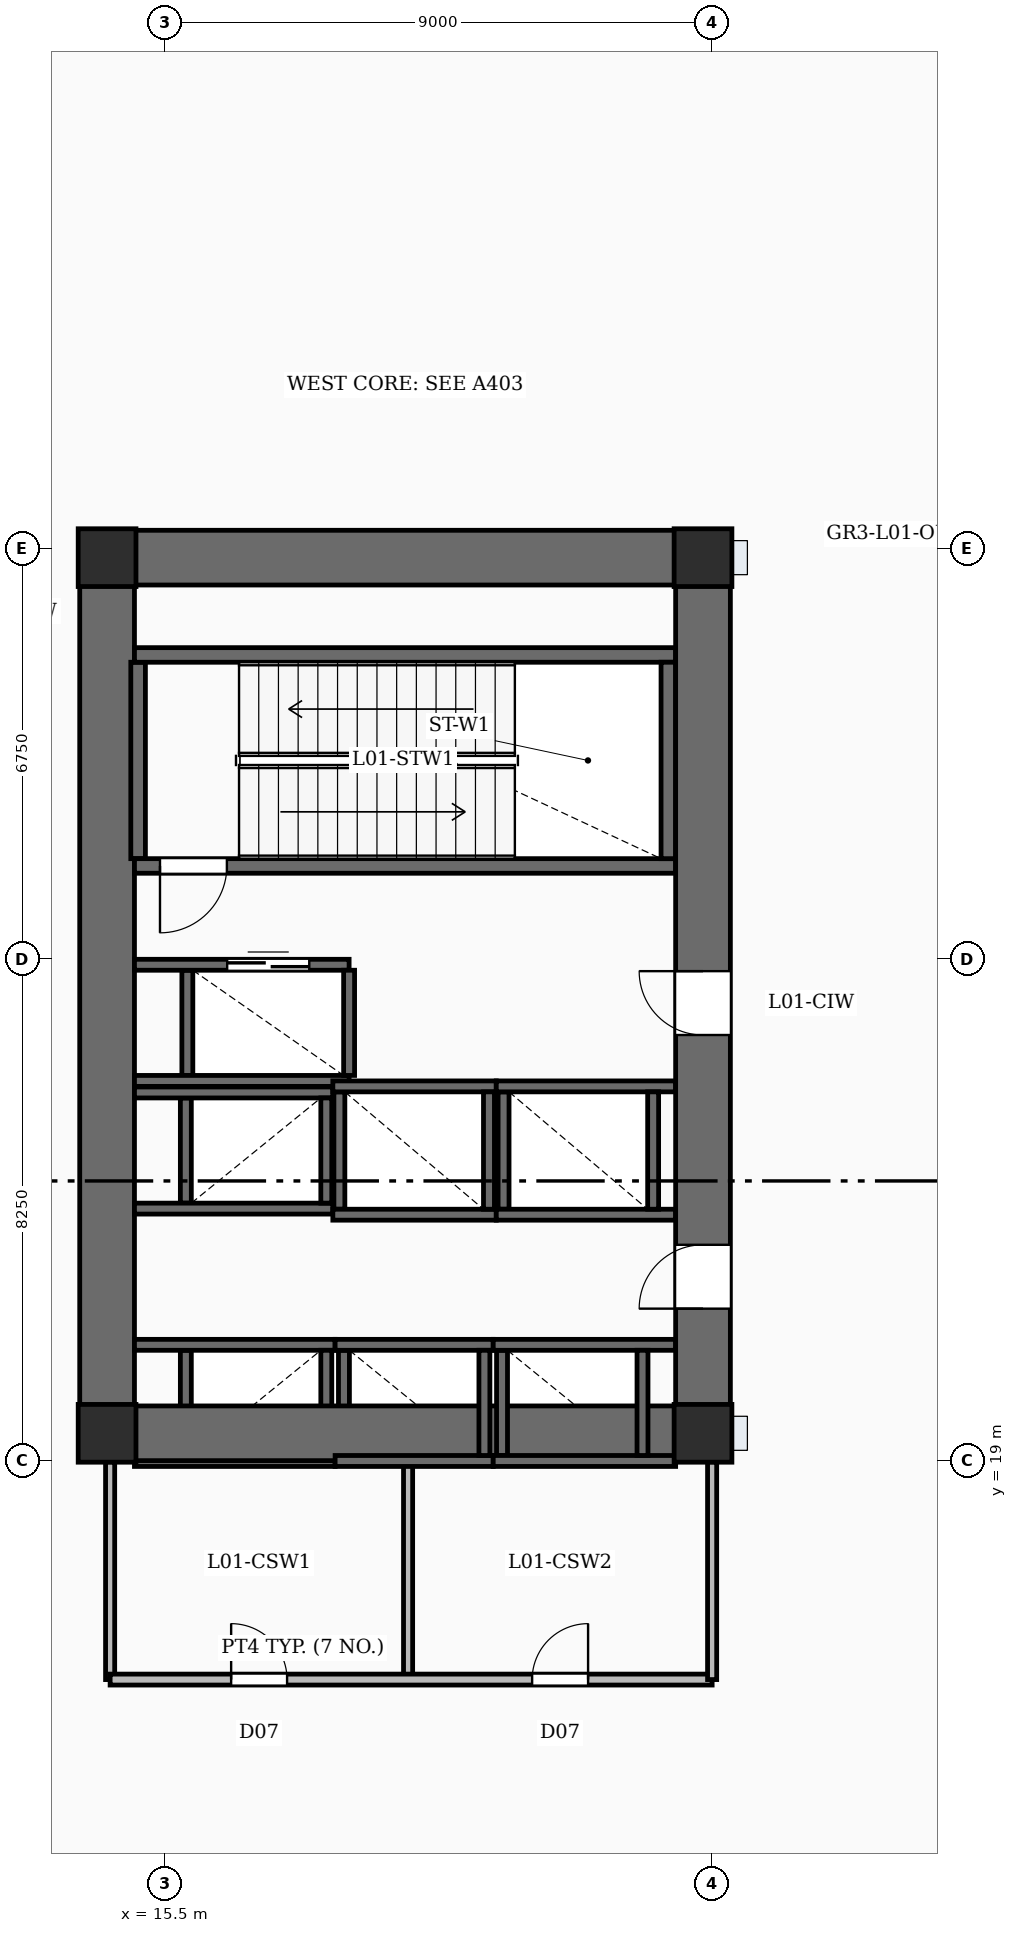
"""IFC4 building model, lengths in metres.
Left out: names, types, materials, properties, quantities, classifications, styles, units other than length and angle.
Written with IfcOpenShell. Run it as: python <this file> out.ifc"""

import sys

from ifc_helpers import new_model, si_unit, direction, frame, frame_2d, origin, origin_2d, place, context, subcontext, project, spatial, rectangle, extrude, element, fill, save


model = new_model("IFC4")
c1 = context("Model", 3, precision=1e-05, world=origin(), true_north=direction((0.0, 1.0)))
c2 = subcontext(c1, "Body", "Model", "MODEL_VIEW")
j1 = project(units=[si_unit("LENGTHUNIT", "METRE"), si_unit("PLANEANGLEUNIT", "RADIAN")], contexts=[c1])
p1 = place(None, origin())
s1 = spatial("IfcSite", under=j1, at=p1, CompositionType="ELEMENT")
p2 = place(p1, origin())
s2 = spatial("IfcBuilding", under=s1, at=p2, CompositionType="ELEMENT")
p3 = place(p2, frame((0.0, 0.0, 8.0)))
s3 = spatial("IfcBuildingStorey", under=s2, at=p3, CompositionType="ELEMENT", Elevation=8.0)
p4 = place(p3, frame((14.55, 19.0, -0.35), z_axis=(0.0, 0.0, 1.0), x_axis=(0.0, 1.0, 0.0)))
e1 = element("IfcWall", 1, at=p4, inside=s3, PredefinedType="SHEAR", context=c2, shape_type="SweptSolid", body=[
    extrude(rectangle(XDim=15.3, YDim=0.9, at=frame_2d((7.65, 0.0))), origin(), (0.0, 0.0, 1.0), 5.0),
])
p5 = place(p3, frame((24.35, 19.0, -0.35), z_axis=(0.0, 0.0, 1.0), x_axis=(0.0, 1.0, 0.0)))
e2 = element("IfcWall", 2, at=p5, inside=s3, PredefinedType="SHEAR", context=c2, shape_type="SweptSolid", body=[
    extrude(rectangle(XDim=15.3, YDim=0.9, at=frame_2d((7.65, 0.0))), origin(), (0.0, 0.0, 1.0), 5.0),
])
p6 = place(p5, frame((2.5, 0.0, 0.35)))
e3 = element("IfcOpeningElement", 3, at=p6, cuts=e2, PredefinedType="OPENING", context=c2, shape_type="SweptSolid", body=[
    extrude(rectangle(XDim=1.05, YDim=2.15, at=frame_2d((0.525, 1.075))), frame((0.0, 0.46, 0.0), z_axis=(0.0, -1.0, 0.0), x_axis=(1.0, 0.0, 0.0)), (0.0, 0.0, 1.0), 0.92),
])
p7 = place(p5, frame((7.0, 0.0, 0.35)))
e4 = element("IfcOpeningElement", 4, at=p7, cuts=e2, PredefinedType="OPENING", context=c2, shape_type="SweptSolid", body=[
    extrude(rectangle(XDim=1.05, YDim=2.15, at=frame_2d((0.525, 1.075))), frame((0.0, 0.46, 0.0), z_axis=(0.0, -1.0, 0.0), x_axis=(1.0, 0.0, 0.0)), (0.0, 0.0, 1.0), 0.92),
])
for number, where, z_axis, x_axis in (
    (5, (15.0, 19.45, -0.35), (0.0, 0.0, 1.0), (1.0, 0.0, 0.0)),
    (6, (15.0, 33.85, -0.35), (0.0, 0.0, 1.0), (1.0, 0.0, 0.0)),
):
    element("IfcWall", number, at=place(p3, frame(where, z_axis=z_axis, x_axis=x_axis)), inside=s3, PredefinedType="SHEAR", context=c2, shape_type="SweptSolid", body=[
        extrude(rectangle(XDim=8.9, YDim=0.9, at=frame_2d((4.45, 0.0))), origin(), (0.0, 0.0, 1.0), 5.0),
    ])
for number, where, z_axis, x_axis in (
    (7, (14.55, 19.45, -0.35), (0.0, 0.0, 1.0), (1.0, 0.0, 0.0)),
    (8, (24.35, 19.45, -0.35), (0.0, 0.0, 1.0), (1.0, 0.0, 0.0)),
    (9, (14.55, 33.85, -0.35), (0.0, 0.0, 1.0), (1.0, 0.0, 0.0)),
    (10, (24.35, 33.85, -0.35), (0.0, 0.0, 1.0), (1.0, 0.0, 0.0)),
):
    element("IfcColumn", number, at=place(p3, frame(where, z_axis=z_axis, x_axis=x_axis)), inside=s3, PredefinedType="COLUMN", context=c2, shape_type="SweptSolid", body=[
        extrude(rectangle(XDim=0.95, YDim=0.95, at=origin_2d()), origin(), (0.0, 0.0, 1.0), 5.0),
    ])
p8 = place(p3, frame((23.9, 28.78, 0.0), z_axis=(0.0, 0.0, 1.0), x_axis=(-1.0, 0.0, 0.0)))
e11 = element("IfcWall", 11, at=p8, inside=s3, PredefinedType="SOLIDWALL", context=c2, shape_type="SweptSolid", body=[
    extrude(rectangle(XDim=8.9, YDim=0.24, at=frame_2d((4.45, 0.0))), origin(), (0.0, 0.0, 1.0), 4.65),
])
p9 = place(p8, frame((7.38, 0.0, 0.0)))
e12 = element("IfcOpeningElement", 12, at=p9, cuts=e11, PredefinedType="OPENING", context=c2, shape_type="SweptSolid", body=[
    extrude(rectangle(XDim=1.1, YDim=2.15, at=frame_2d((0.55, 1.075))), frame((0.0, 0.13, 0.0), z_axis=(0.0, -1.0, 0.0), x_axis=(1.0, 0.0, 0.0)), (0.0, 0.0, 1.0), 0.26),
])
p10 = place(p3, frame((15.0, 32.25, 0.0), z_axis=(0.0, 0.0, 1.0), x_axis=(1.0, 0.0, 0.0)))
e13 = element("IfcWall", 13, at=p10, inside=s3, PredefinedType="SOLIDWALL", context=c2, shape_type="SweptSolid", body=[
    extrude(rectangle(XDim=8.9, YDim=0.24, at=frame_2d((4.45, 0.0))), origin(), (0.0, 0.0, 1.0), 4.65),
])
for number, where, z_axis, x_axis in (
    (14, (15.06, 28.9, 0.0), (0.0, 0.0, 1.0), (0.0, 1.0, 0.0)),
    (15, (23.78, 28.9, 0.0), (0.0, 0.0, 1.0), (0.0, 1.0, 0.0)),
):
    element("IfcWall", number, at=place(p3, frame(where, z_axis=z_axis, x_axis=x_axis)), inside=s3, PredefinedType="SOLIDWALL", context=c2, shape_type="SweptSolid", body=[
        extrude(rectangle(XDim=3.23, YDim=0.24, at=frame_2d((1.615, 0.0))), origin(), (0.0, 0.0, 1.0), 4.65),
    ])
for number, where, z_axis, x_axis in (
    (16, (15.0, 20.905, 0.0), (0.0, 0.0, 1.0), (1.0, 0.0, 0.0)),
    (17, (15.0, 18.995, 0.0), (0.0, 0.0, 1.0), (1.0, 0.0, 0.0)),
):
    element("IfcWall", number, at=place(p3, frame(where, z_axis=z_axis, x_axis=x_axis)), inside=s3, PredefinedType="SOLIDWALL", context=c2, shape_type="SweptSolid", body=[
        extrude(rectangle(XDim=3.3, YDim=0.18, at=frame_2d((1.65, 0.0))), origin(), (0.0, 0.0, 1.0), 4.65),
    ])
for number, where, z_axis, x_axis in (
    (18, (15.845, 19.085, 0.0), (0.0, 0.0, 1.0), (0.0, 1.0, 0.0)),
    (19, (18.155, 19.085, 0.0), (0.0, 0.0, 1.0), (0.0, 1.0, 0.0)),
):
    element("IfcWall", number, at=place(p3, frame(where, z_axis=z_axis, x_axis=x_axis)), inside=s3, PredefinedType="SOLIDWALL", context=c2, shape_type="SweptSolid", body=[
        extrude(rectangle(XDim=1.73, YDim=0.18, at=frame_2d((0.865, 0.0))), origin(), (0.0, 0.0, 1.0), 4.65),
    ])
for number, where, z_axis, x_axis in (
    (20, (18.3, 20.905, 0.0), (0.0, 0.0, 1.0), (1.0, 0.0, 0.0)),
    (21, (18.3, 18.995, 0.0), (0.0, 0.0, 1.0), (1.0, 0.0, 0.0)),
):
    element("IfcWall", number, at=place(p3, frame(where, z_axis=z_axis, x_axis=x_axis)), inside=s3, PredefinedType="SOLIDWALL", context=c2, shape_type="SweptSolid", body=[
        extrude(rectangle(XDim=2.6, YDim=0.18, at=frame_2d((1.3, 0.0))), origin(), (0.0, 0.0, 1.0), 4.65),
    ])
for number, where, z_axis, x_axis in (
    (22, (18.445, 19.085, 0.0), (0.0, 0.0, 1.0), (0.0, 1.0, 0.0)),
    (23, (20.755, 19.085, 0.0), (0.0, 0.0, 1.0), (0.0, 1.0, 0.0)),
):
    element("IfcWall", number, at=place(p3, frame(where, z_axis=z_axis, x_axis=x_axis)), inside=s3, PredefinedType="SOLIDWALL", context=c2, shape_type="SweptSolid", body=[
        extrude(rectangle(XDim=1.73, YDim=0.18, at=frame_2d((0.865, 0.0))), origin(), (0.0, 0.0, 1.0), 4.65),
    ])
for number, where, z_axis, x_axis in (
    (24, (20.9, 20.905, 0.0), (0.0, 0.0, 1.0), (1.0, 0.0, 0.0)),
    (25, (20.9, 18.995, 0.0), (0.0, 0.0, 1.0), (1.0, 0.0, 0.0)),
):
    element("IfcWall", number, at=place(p3, frame(where, z_axis=z_axis, x_axis=x_axis)), inside=s3, PredefinedType="SOLIDWALL", context=c2, shape_type="SweptSolid", body=[
        extrude(rectangle(XDim=3.0, YDim=0.18, at=frame_2d((1.5, 0.0))), origin(), (0.0, 0.0, 1.0), 4.65),
    ])
for number, where, z_axis, x_axis in (
    (26, (21.045, 19.085, 0.0), (0.0, 0.0, 1.0), (0.0, 1.0, 0.0)),
    (27, (23.355, 19.085, 0.0), (0.0, 0.0, 1.0), (0.0, 1.0, 0.0)),
):
    element("IfcWall", number, at=place(p3, frame(where, z_axis=z_axis, x_axis=x_axis)), inside=s3, PredefinedType="SOLIDWALL", context=c2, shape_type="SweptSolid", body=[
        extrude(rectangle(XDim=1.73, YDim=0.18, at=frame_2d((0.865, 0.0))), origin(), (0.0, 0.0, 1.0), 4.65),
    ])
for number, where, z_axis, x_axis in (
    (28, (15.0, 25.055, 0.0), (0.0, 0.0, 1.0), (1.0, 0.0, 0.0)),
    (29, (15.0, 23.145, 0.0), (0.0, 0.0, 1.0), (1.0, 0.0, 0.0)),
):
    element("IfcWall", number, at=place(p3, frame(where, z_axis=z_axis, x_axis=x_axis)), inside=s3, PredefinedType="SOLIDWALL", context=c2, shape_type="SweptSolid", body=[
        extrude(rectangle(XDim=3.262, YDim=0.18, at=frame_2d((1.631, 0.0))), origin(), (0.0, 0.0, 1.0), 4.65),
    ])
for number, where, z_axis, x_axis in (
    (30, (15.845, 23.235, 0.0), (0.0, 0.0, 1.0), (0.0, 1.0, 0.0)),
    (31, (18.155, 23.235, 0.0), (0.0, 0.0, 1.0), (0.0, 1.0, 0.0)),
):
    element("IfcWall", number, at=place(p3, frame(where, z_axis=z_axis, x_axis=x_axis)), inside=s3, PredefinedType="SOLIDWALL", context=c2, shape_type="SweptSolid", body=[
        extrude(rectangle(XDim=1.73, YDim=0.18, at=frame_2d((0.865, 0.0))), origin(), (0.0, 0.0, 1.0), 4.65),
    ])
for number, where, z_axis, x_axis in (
    (32, (18.262, 25.155, 0.0), (0.0, 0.0, 1.0), (1.0, 0.0, 0.0)),
    (33, (18.262, 23.045, 0.0), (0.0, 0.0, 1.0), (1.0, 0.0, 0.0)),
):
    element("IfcWall", number, at=place(p3, frame(where, z_axis=z_axis, x_axis=x_axis)), inside=s3, PredefinedType="SOLIDWALL", context=c2, shape_type="SweptSolid", body=[
        extrude(rectangle(XDim=2.688, YDim=0.18, at=frame_2d((1.344, 0.0))), origin(), (0.0, 0.0, 1.0), 4.65),
    ])
for number, where, z_axis, x_axis in (
    (34, (18.37, 23.135, 0.0), (0.0, 0.0, 1.0), (0.0, 1.0, 0.0)),
    (35, (20.83, 23.135, 0.0), (0.0, 0.0, 1.0), (0.0, 1.0, 0.0)),
):
    element("IfcWall", number, at=place(p3, frame(where, z_axis=z_axis, x_axis=x_axis)), inside=s3, PredefinedType="SOLIDWALL", context=c2, shape_type="SweptSolid", body=[
        extrude(rectangle(XDim=1.93, YDim=0.18, at=frame_2d((0.965, 0.0))), origin(), (0.0, 0.0, 1.0), 4.65),
    ])
for number, where, z_axis, x_axis in (
    (36, (20.95, 25.155, 0.0), (0.0, 0.0, 1.0), (1.0, 0.0, 0.0)),
    (37, (20.95, 23.045, 0.0), (0.0, 0.0, 1.0), (1.0, 0.0, 0.0)),
):
    element("IfcWall", number, at=place(p3, frame(where, z_axis=z_axis, x_axis=x_axis)), inside=s3, PredefinedType="SOLIDWALL", context=c2, shape_type="SweptSolid", body=[
        extrude(rectangle(XDim=2.95, YDim=0.18, at=frame_2d((1.475, 0.0))), origin(), (0.0, 0.0, 1.0), 4.65),
    ])
for number, where, z_axis, x_axis in (
    (38, (21.07, 23.135, 0.0), (0.0, 0.0, 1.0), (0.0, 1.0, 0.0)),
    (39, (23.53, 23.135, 0.0), (0.0, 0.0, 1.0), (0.0, 1.0, 0.0)),
):
    element("IfcWall", number, at=place(p3, frame(where, z_axis=z_axis, x_axis=x_axis)), inside=s3, PredefinedType="SOLIDWALL", context=c2, shape_type="SweptSolid", body=[
        extrude(rectangle(XDim=1.93, YDim=0.18, at=frame_2d((0.965, 0.0))), origin(), (0.0, 0.0, 1.0), 4.65),
    ])
p11 = place(p3, frame((15.0, 27.155, 0.0), z_axis=(0.0, 0.0, 1.0), x_axis=(1.0, 0.0, 0.0)))
e40 = element("IfcWall", 40, at=p11, inside=s3, PredefinedType="SOLIDWALL", context=c2, shape_type="SweptSolid", body=[
    extrude(rectangle(XDim=3.53, YDim=0.18, at=frame_2d((1.765, 0.0))), origin(), (0.0, 0.0, 1.0), 4.65),
])
p12 = place(p11, frame((1.525, 0.0, 0.0)))
e41 = element("IfcOpeningElement", 41, at=p12, cuts=e40, PredefinedType="OPENING", context=c2, shape_type="SweptSolid", body=[
    extrude(rectangle(XDim=1.35, YDim=2.3, at=frame_2d((0.675, 1.15))), frame((0.0, 0.1, 0.0), z_axis=(0.0, -1.0, 0.0), x_axis=(1.0, 0.0, 0.0)), (0.0, 0.0, 1.0), 0.2),
])
p13 = place(p3, frame((15.0, 25.245, 0.0), z_axis=(0.0, 0.0, 1.0), x_axis=(1.0, 0.0, 0.0)))
e42 = element("IfcWall", 42, at=p13, inside=s3, PredefinedType="SOLIDWALL", context=c2, shape_type="SweptSolid", body=[
    extrude(rectangle(XDim=3.53, YDim=0.18, at=frame_2d((1.765, 0.0))), origin(), (0.0, 0.0, 1.0), 4.65),
])
for number, where, z_axis, x_axis in (
    (43, (15.87, 25.335, 0.0), (0.0, 0.0, 1.0), (0.0, 1.0, 0.0)),
    (44, (18.53, 25.335, 0.0), (0.0, 0.0, 1.0), (0.0, 1.0, 0.0)),
):
    element("IfcWall", number, at=place(p3, frame(where, z_axis=z_axis, x_axis=x_axis)), inside=s3, PredefinedType="SOLIDWALL", context=c2, shape_type="SweptSolid", body=[
        extrude(rectangle(XDim=1.73, YDim=0.18, at=frame_2d((0.865, 0.0))), origin(), (0.0, 0.0, 1.0), 4.65),
    ])
p14 = place(p3, frame((19.5, 15.4, 0.0), z_axis=(0.0, 0.0, 1.0), x_axis=(0.0, 1.0, 0.0)))
e45 = element("IfcWall", 45, at=p14, inside=s3, PredefinedType="PARTITIONING", context=c2, shape_type="SweptSolid", body=[
    extrude(rectangle(XDim=3.58, YDim=0.15, at=frame_2d((1.79, 0.0))), origin(), (0.0, 0.0, 1.0), 3.71),
])
p15 = place(p3, frame((14.6, 15.4, 0.0), z_axis=(0.0, 0.0, 1.0), x_axis=(1.0, 0.0, 0.0)))
e46 = element("IfcWall", 46, at=p15, inside=s3, PredefinedType="PARTITIONING", context=c2, shape_type="SweptSolid", body=[
    extrude(rectangle(XDim=9.9, YDim=0.18, at=frame_2d((4.95, 0.0))), origin(), (0.0, 0.0, 1.0), 3.71),
])
p16 = place(p15, frame((1.99, 0.0, 0.0)))
e47 = element("IfcOpeningElement", 47, at=p16, cuts=e46, PredefinedType="OPENING", context=c2, shape_type="SweptSolid", body=[
    extrude(rectangle(XDim=0.92, YDim=2.1, at=frame_2d((0.46, 1.05))), frame((0.0, 0.1, 0.0), z_axis=(0.0, -1.0, 0.0), x_axis=(1.0, 0.0, 0.0)), (0.0, 0.0, 1.0), 0.2),
])
p17 = place(p15, frame((6.94, 0.0, 0.0)))
e48 = element("IfcOpeningElement", 48, at=p17, cuts=e46, PredefinedType="OPENING", context=c2, shape_type="SweptSolid", body=[
    extrude(rectangle(XDim=0.92, YDim=2.1, at=frame_2d((0.46, 1.05))), frame((0.0, 0.1, 0.0), z_axis=(0.0, -1.0, 0.0), x_axis=(1.0, 0.0, 0.0)), (0.0, 0.0, 1.0), 0.2),
])
for number, where, z_axis, x_axis in (
    (49, (14.6, 15.4, 0.0), (0.0, 0.0, 1.0), (0.0, 1.0, 0.0)),
    (50, (24.5, 15.4, 0.0), (0.0, 0.0, 1.0), (0.0, 1.0, 0.0)),
):
    element("IfcWall", number, at=place(p3, frame(where, z_axis=z_axis, x_axis=x_axis)), inside=s3, PredefinedType="PARTITIONING", context=c2, shape_type="SweptSolid", body=[
        extrude(rectangle(XDim=3.58, YDim=0.15, at=frame_2d((1.79, 0.0))), origin(), (0.0, 0.0, 1.0), 3.71),
    ])
p18 = place(p6, origin())
e51 = element("IfcDoor", 51, at=p18, inside=s3, OperationType="SINGLE_SWING_LEFT", PredefinedType="DOOR", context=c2, shape_type="SweptSolid", body=[
    extrude(rectangle(XDim=1.05, YDim=2.15, at=frame_2d((0.525, 1.075))), frame((0.0, 0.025, 0.0), z_axis=(0.0, -1.0, 0.0), x_axis=(1.0, 0.0, 0.0)), (0.0, 0.0, 1.0), 0.05),
])
fill(e3, e51)
p19 = place(p7, origin())
e52 = element("IfcDoor", 52, at=p19, inside=s3, OperationType="SINGLE_SWING_RIGHT", PredefinedType="DOOR", context=c2, shape_type="SweptSolid", body=[
    extrude(rectangle(XDim=1.05, YDim=2.15, at=frame_2d((0.525, 1.075))), frame((0.0, 0.025, 0.0), z_axis=(0.0, -1.0, 0.0), x_axis=(1.0, 0.0, 0.0)), (0.0, 0.0, 1.0), 0.05),
])
fill(e4, e52)
p20 = place(p9, origin())
e53 = element("IfcDoor", 53, at=p20, inside=s3, OperationType="SINGLE_SWING_RIGHT", PredefinedType="DOOR", context=c2, shape_type="SweptSolid", body=[
    extrude(rectangle(XDim=1.1, YDim=2.15, at=frame_2d((0.55, 1.075))), frame((0.0, 0.025, 0.0), z_axis=(0.0, -1.0, 0.0), x_axis=(1.0, 0.0, 0.0)), (0.0, 0.0, 1.0), 0.05),
])
fill(e12, e53)
p21 = place(p12, origin())
e54 = element("IfcDoor", 54, at=p21, inside=s3, OperationType="DOUBLE_DOOR_SLIDING", PredefinedType="DOOR", context=c2, shape_type="SweptSolid", body=[
    extrude(rectangle(XDim=1.35, YDim=2.3, at=frame_2d((0.675, 1.15))), frame((0.0, 0.025, 0.0), z_axis=(0.0, -1.0, 0.0), x_axis=(1.0, 0.0, 0.0)), (0.0, 0.0, 1.0), 0.05),
])
fill(e41, e54)
p22 = place(p16, origin())
e55 = element("IfcDoor", 55, at=p22, inside=s3, OperationType="SINGLE_SWING_LEFT", PredefinedType="DOOR", context=c2, shape_type="SweptSolid", body=[
    extrude(rectangle(XDim=0.92, YDim=2.1, at=frame_2d((0.46, 1.05))), frame((0.0, 0.025, 0.0), z_axis=(0.0, -1.0, 0.0), x_axis=(1.0, 0.0, 0.0)), (0.0, 0.0, 1.0), 0.05),
])
fill(e47, e55)
p23 = place(p17, origin())
e56 = element("IfcDoor", 56, at=p23, inside=s3, OperationType="SINGLE_SWING_RIGHT", PredefinedType="DOOR", context=c2, shape_type="SweptSolid", body=[
    extrude(rectangle(XDim=0.92, YDim=2.1, at=frame_2d((0.46, 1.05))), frame((0.0, 0.025, 0.0), z_axis=(0.0, -1.0, 0.0), x_axis=(1.0, 0.0, 0.0)), (0.0, 0.0, 1.0), 0.05),
])
fill(e48, e56)
save(model, sys.argv[1])
